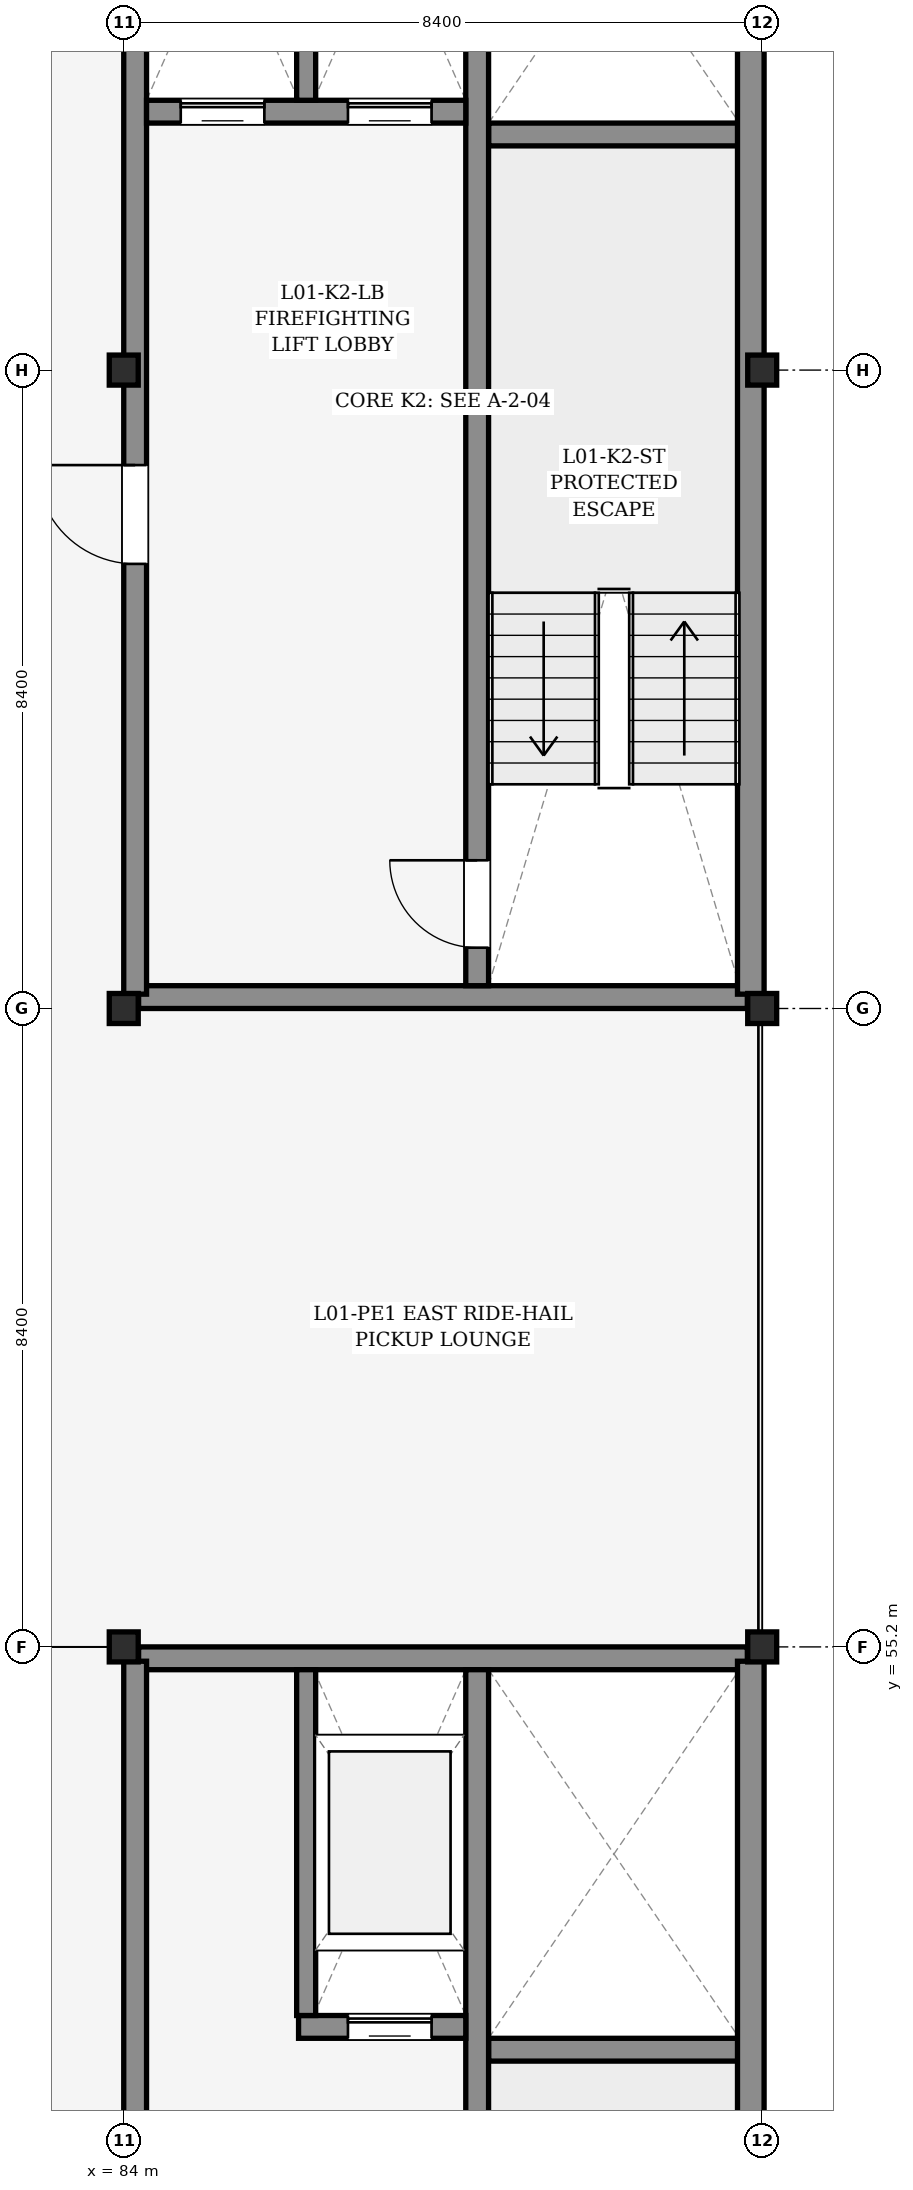
"""IFC4 building model, lengths in metres.
Left out: names, types, materials, properties, quantities, classifications, styles, units other than length and angle.
Written with IfcOpenShell. Run it as: python <this file> out.ifc"""

import sys

from ifc_helpers import new_model, si_unit, direction, frame, frame_2d, origin, origin_2d, place, context, subcontext, project, spatial, rectangle, i_section, extrude, element, fill, save


model = new_model("IFC4")
c1 = context("Model", 3, precision=1e-05, world=origin(), true_north=direction((0.0, 1.0)))
c2 = subcontext(c1, "Body", "Model", "MODEL_VIEW")
j1 = project(units=[si_unit("LENGTHUNIT", "METRE"), si_unit("PLANEANGLEUNIT", "RADIAN")], contexts=[c1])
p1 = place(None, origin())
s1 = spatial("IfcSite", under=j1, at=p1, CompositionType="ELEMENT")
p2 = place(p1, origin())
s2 = spatial("IfcBuilding", under=s1, at=p2, CompositionType="ELEMENT")
p3 = place(p2, frame((0.0, 0.0, 5.4)))
s3 = spatial("IfcBuildingStorey", under=s2, at=p3, CompositionType="ELEMENT", Elevation=5.4)
for number, where, z_axis, x_axis in (
    (1, (84.0, 55.2, 0.0), (0.0, 0.0, 1.0), (1.0, 0.0, 0.0)),
    (2, (84.0, 63.6, 0.0), (0.0, 0.0, 1.0), (1.0, 0.0, 0.0)),
    (3, (84.0, 72.0, 0.0), (0.0, 0.0, 1.0), (1.0, 0.0, 0.0)),
    (4, (92.4, 55.2, 0.0), (0.0, 0.0, 1.0), (1.0, 0.0, 0.0)),
    (5, (92.4, 63.6, 0.0), (0.0, 0.0, 1.0), (1.0, 0.0, 0.0)),
    (6, (92.4, 72.0, 0.0), (0.0, 0.0, 1.0), (1.0, 0.0, 0.0)),
):
    element("IfcColumn", number, at=place(p3, frame(where, z_axis=z_axis, x_axis=x_axis)), inside=s3, PredefinedType="COLUMN", context=c2, shape_type="SweptSolid", body=[
        extrude(i_section(OverallWidth=0.395, OverallDepth=0.381, WebThickness=0.018, FlangeThickness=0.03, FilletRadius=0.015, at=origin_2d()), origin(), (0.0, 0.0, 1.0), 3.6),
    ])
p4 = place(p3, frame((84.196, 63.75, 0.0), z_axis=(0.0, 0.0, 1.0), x_axis=(1.0, 0.0, 0.0)))
e7 = element("IfcWall", 7, at=p4, inside=s3, PredefinedType="SHEAR", context=c2, shape_type="SweptSolid", body=[
    extrude(rectangle(XDim=8.009, YDim=0.3, at=frame_2d((4.004, 0.0))), origin(), (0.0, 0.0, 1.0), 3.38),
])
p5 = place(p3, frame((88.8, 75.1, 0.0), z_axis=(0.0, 0.0, 1.0), x_axis=(1.0, 0.0, 0.0)))
e8 = element("IfcWall", 8, at=p5, inside=s3, PredefinedType="SHEAR", context=c2, shape_type="SweptSolid", body=[
    extrude(rectangle(XDim=3.3, YDim=0.3, at=frame_2d((1.65, 0.0))), origin(), (0.0, 0.0, 1.0), 3.38),
])
p6 = place(p3, frame((92.25, 63.789, 0.0), z_axis=(0.0, 0.0, 1.0), x_axis=(0.0, 1.0, 0.0)))
e9 = element("IfcWall", 9, at=p6, inside=s3, PredefinedType="SHEAR", context=c2, shape_type="SweptSolid", body=[
    extrude(rectangle(XDim=16.423, YDim=0.35, at=frame_2d((8.211, 0.0))), origin(), (0.0, 0.0, 1.0), 3.38),
])
p7 = place(p3, frame((84.15, 63.789, 0.0), z_axis=(0.0, 0.0, 1.0), x_axis=(0.0, 1.0, 0.0)))
e10 = element("IfcWall", 10, at=p7, inside=s3, PredefinedType="SHEAR", context=c2, shape_type="SweptSolid", body=[
    extrude(rectangle(XDim=16.423, YDim=0.3, at=frame_2d((8.211, 0.0))), origin(), (0.0, 0.0, 1.0), 3.38),
])
p8 = place(p7, frame((5.662, 0.0, 0.0)))
e11 = element("IfcOpeningElement", 11, at=p8, cuts=e10, PredefinedType="OPENING", context=c2, shape_type="SweptSolid", body=[
    extrude(rectangle(XDim=1.3, YDim=2.2, at=frame_2d((0.65, 1.1))), frame((0.0, 0.16, 0.0), z_axis=(0.0, -1.0, 0.0), x_axis=(1.0, 0.0, 0.0)), (0.0, 0.0, 1.0), 0.32),
])
p9 = place(p3, frame((88.65, 63.9, 0.0), z_axis=(0.0, 0.0, 1.0), x_axis=(0.0, 1.0, 0.0)))
e12 = element("IfcWall", 12, at=p9, inside=s3, PredefinedType="SHEAR", context=c2, shape_type="SweptSolid", body=[
    extrude(rectangle(XDim=16.2, YDim=0.3, at=frame_2d((8.1, 0.0))), origin(), (0.0, 0.0, 1.0), 3.38),
])
p10 = place(p9, frame((0.5, 0.0, 0.0)))
e13 = element("IfcOpeningElement", 13, at=p10, cuts=e12, PredefinedType="OPENING", context=c2, shape_type="SweptSolid", body=[
    extrude(rectangle(XDim=1.15, YDim=2.15, at=frame_2d((0.575, 1.075))), frame((0.0, 0.16, 0.0), z_axis=(0.0, -1.0, 0.0), x_axis=(1.0, 0.0, 0.0)), (0.0, 0.0, 1.0), 0.32),
])
p11 = place(p3, frame((84.3, 75.4, 0.0), z_axis=(0.0, 0.0, 1.0), x_axis=(1.0, 0.0, 0.0)))
e14 = element("IfcWall", 14, at=p11, inside=s3, PredefinedType="SHEAR", context=c2, shape_type="SweptSolid", body=[
    extrude(rectangle(XDim=4.2, YDim=0.3, at=frame_2d((2.1, 0.0))), origin(), (0.0, 0.0, 1.0), 3.38),
])
p12 = place(p11, frame((0.45, 0.0, 0.0)))
e15 = element("IfcOpeningElement", 15, at=p12, cuts=e14, PredefinedType="OPENING", context=c2, shape_type="SweptSolid", body=[
    extrude(rectangle(XDim=1.1, YDim=2.2, at=frame_2d((0.55, 1.1))), frame((0.0, 0.16, 0.0), z_axis=(0.0, -1.0, 0.0), x_axis=(1.0, 0.0, 0.0)), (0.0, 0.0, 1.0), 0.32),
])
p13 = place(p11, frame((2.65, 0.0, 0.0)))
e16 = element("IfcOpeningElement", 16, at=p13, cuts=e14, PredefinedType="OPENING", context=c2, shape_type="SweptSolid", body=[
    extrude(rectangle(XDim=1.1, YDim=2.2, at=frame_2d((0.55, 1.1))), frame((0.0, 0.16, 0.0), z_axis=(0.0, -1.0, 0.0), x_axis=(1.0, 0.0, 0.0)), (0.0, 0.0, 1.0), 0.32),
])
p14 = place(p3, frame((86.4, 75.55, 0.0), z_axis=(0.0, 0.0, 1.0), x_axis=(0.0, 1.0, 0.0)))
e17 = element("IfcWall", 17, at=p14, inside=s3, PredefinedType="PARTITIONING", context=c2, shape_type="SweptSolid", body=[
    extrude(rectangle(XDim=4.55, YDim=0.25, at=frame_2d((2.275, 0.0))), origin(), (0.0, 0.0, 1.0), 2.525),
])
p15 = place(p3, frame((84.196, 55.05, 0.0), z_axis=(0.0, 0.0, 1.0), x_axis=(1.0, 0.0, 0.0)))
e18 = element("IfcWall", 18, at=p15, inside=s3, PredefinedType="SHEAR", context=c2, shape_type="SweptSolid", body=[
    extrude(rectangle(XDim=8.009, YDim=0.3, at=frame_2d((4.004, 0.0))), origin(), (0.0, 0.0, 1.0), 3.38),
])
p16 = place(p3, frame((88.8, 49.9, 0.0), z_axis=(0.0, 0.0, 1.0), x_axis=(1.0, 0.0, 0.0)))
e19 = element("IfcWall", 19, at=p16, inside=s3, PredefinedType="SHEAR", context=c2, shape_type="SweptSolid", body=[
    extrude(rectangle(XDim=3.3, YDim=0.3, at=frame_2d((1.65, 0.0))), origin(), (0.0, 0.0, 1.0), 3.38),
])
p17 = place(p3, frame((92.25, 38.588, 0.0), z_axis=(0.0, 0.0, 1.0), x_axis=(0.0, 1.0, 0.0)))
e20 = element("IfcWall", 20, at=p17, inside=s3, PredefinedType="SHEAR", context=c2, shape_type="SweptSolid", body=[
    extrude(rectangle(XDim=16.423, YDim=0.35, at=frame_2d((8.211, 0.0))), origin(), (0.0, 0.0, 1.0), 3.38),
])
p18 = place(p3, frame((84.15, 38.588, 0.0), z_axis=(0.0, 0.0, 1.0), x_axis=(0.0, 1.0, 0.0)))
e21 = element("IfcWall", 21, at=p18, inside=s3, PredefinedType="SHEAR", context=c2, shape_type="SweptSolid", body=[
    extrude(rectangle(XDim=16.423, YDim=0.3, at=frame_2d((8.211, 0.0))), origin(), (0.0, 0.0, 1.0), 3.38),
])
p19 = place(p18, frame((5.662, 0.0, 0.0)))
e22 = element("IfcOpeningElement", 22, at=p19, cuts=e21, PredefinedType="OPENING", context=c2, shape_type="SweptSolid", body=[
    extrude(rectangle(XDim=1.25, YDim=2.15, at=frame_2d((0.625, 1.075))), frame((0.0, 0.16, 0.0), z_axis=(0.0, -1.0, 0.0), x_axis=(1.0, 0.0, 0.0)), (0.0, 0.0, 1.0), 0.32),
])
p20 = place(p3, frame((88.65, 38.7, 0.0), z_axis=(0.0, 0.0, 1.0), x_axis=(0.0, 1.0, 0.0)))
e23 = element("IfcWall", 23, at=p20, inside=s3, PredefinedType="SHEAR", context=c2, shape_type="SweptSolid", body=[
    extrude(rectangle(XDim=16.2, YDim=0.3, at=frame_2d((8.1, 0.0))), origin(), (0.0, 0.0, 1.0), 3.38),
])
p21 = place(p20, frame((0.5, 0.0, 0.0)))
e24 = element("IfcOpeningElement", 24, at=p21, cuts=e23, PredefinedType="OPENING", context=c2, shape_type="SweptSolid", body=[
    extrude(rectangle(XDim=1.15, YDim=2.15, at=frame_2d((0.575, 1.075))), frame((0.0, 0.16, 0.0), z_axis=(0.0, -1.0, 0.0), x_axis=(1.0, 0.0, 0.0)), (0.0, 0.0, 1.0), 0.32),
])
p22 = place(p3, frame((86.3, 50.2, 0.0), z_axis=(0.0, 0.0, 1.0), x_axis=(1.0, 0.0, 0.0)))
e25 = element("IfcWall", 25, at=p22, inside=s3, PredefinedType="SHEAR", context=c2, shape_type="SweptSolid", body=[
    extrude(rectangle(XDim=2.2, YDim=0.3, at=frame_2d((1.1, 0.0))), origin(), (0.0, 0.0, 1.0), 3.38),
])
p23 = place(p22, frame((0.65, 0.0, 0.0)))
e26 = element("IfcOpeningElement", 26, at=p23, cuts=e25, PredefinedType="OPENING", context=c2, shape_type="SweptSolid", body=[
    extrude(rectangle(XDim=1.1, YDim=2.2, at=frame_2d((0.55, 1.1))), frame((0.0, 0.16, 0.0), z_axis=(0.0, -1.0, 0.0), x_axis=(1.0, 0.0, 0.0)), (0.0, 0.0, 1.0), 0.32),
])
p24 = place(p3, frame((86.4, 50.35, 0.0), z_axis=(0.0, 0.0, 1.0), x_axis=(0.0, 1.0, 0.0)))
e27 = element("IfcWall", 27, at=p24, inside=s3, PredefinedType="PARTITIONING", context=c2, shape_type="SweptSolid", body=[
    extrude(rectangle(XDim=4.55, YDim=0.25, at=frame_2d((2.275, 0.0))), origin(), (0.0, 0.0, 1.0), 2.525),
])
p25 = place(p8, origin())
e28 = element("IfcDoor", 28, at=p25, inside=s3, OperationType="SINGLE_SWING_RIGHT", PredefinedType="DOOR", context=c2, shape_type="SweptSolid", body=[
    extrude(rectangle(XDim=1.3, YDim=2.2, at=frame_2d((0.65, 1.1))), frame((0.0, 0.025, 0.0), z_axis=(0.0, -1.0, 0.0), x_axis=(1.0, 0.0, 0.0)), (0.0, 0.0, 1.0), 0.05),
])
fill(e11, e28)
p26 = place(p10, origin())
e29 = element("IfcDoor", 29, at=p26, inside=s3, OperationType="SINGLE_SWING_RIGHT", PredefinedType="DOOR", context=c2, shape_type="SweptSolid", body=[
    extrude(rectangle(XDim=1.15, YDim=2.15, at=frame_2d((0.575, 1.075))), frame((0.0, 0.025, 0.0), z_axis=(0.0, -1.0, 0.0), x_axis=(1.0, 0.0, 0.0)), (0.0, 0.0, 1.0), 0.05),
])
fill(e13, e29)
p27 = place(p12, origin())
e30 = element("IfcDoor", 30, at=p27, inside=s3, OperationType="SLIDING_TO_LEFT", PredefinedType="DOOR", context=c2, shape_type="SweptSolid", body=[
    extrude(rectangle(XDim=1.1, YDim=2.2, at=frame_2d((0.55, 1.1))), frame((0.0, 0.025, 0.0), z_axis=(0.0, -1.0, 0.0), x_axis=(1.0, 0.0, 0.0)), (0.0, 0.0, 1.0), 0.05),
])
fill(e15, e30)
p28 = place(p13, origin())
e31 = element("IfcDoor", 31, at=p28, inside=s3, OperationType="SLIDING_TO_LEFT", PredefinedType="DOOR", context=c2, shape_type="SweptSolid", body=[
    extrude(rectangle(XDim=1.1, YDim=2.2, at=frame_2d((0.55, 1.1))), frame((0.0, 0.025, 0.0), z_axis=(0.0, -1.0, 0.0), x_axis=(1.0, 0.0, 0.0)), (0.0, 0.0, 1.0), 0.05),
])
fill(e16, e31)
p29 = place(p23, origin())
e32 = element("IfcDoor", 32, at=p29, inside=s3, OperationType="SLIDING_TO_LEFT", PredefinedType="DOOR", context=c2, shape_type="SweptSolid", body=[
    extrude(rectangle(XDim=1.1, YDim=2.2, at=frame_2d((0.55, 1.1))), frame((0.0, 0.025, 0.0), z_axis=(0.0, -1.0, 0.0), x_axis=(1.0, 0.0, 0.0)), (0.0, 0.0, 1.0), 0.05),
])
fill(e26, e32)
save(model, sys.argv[1])
